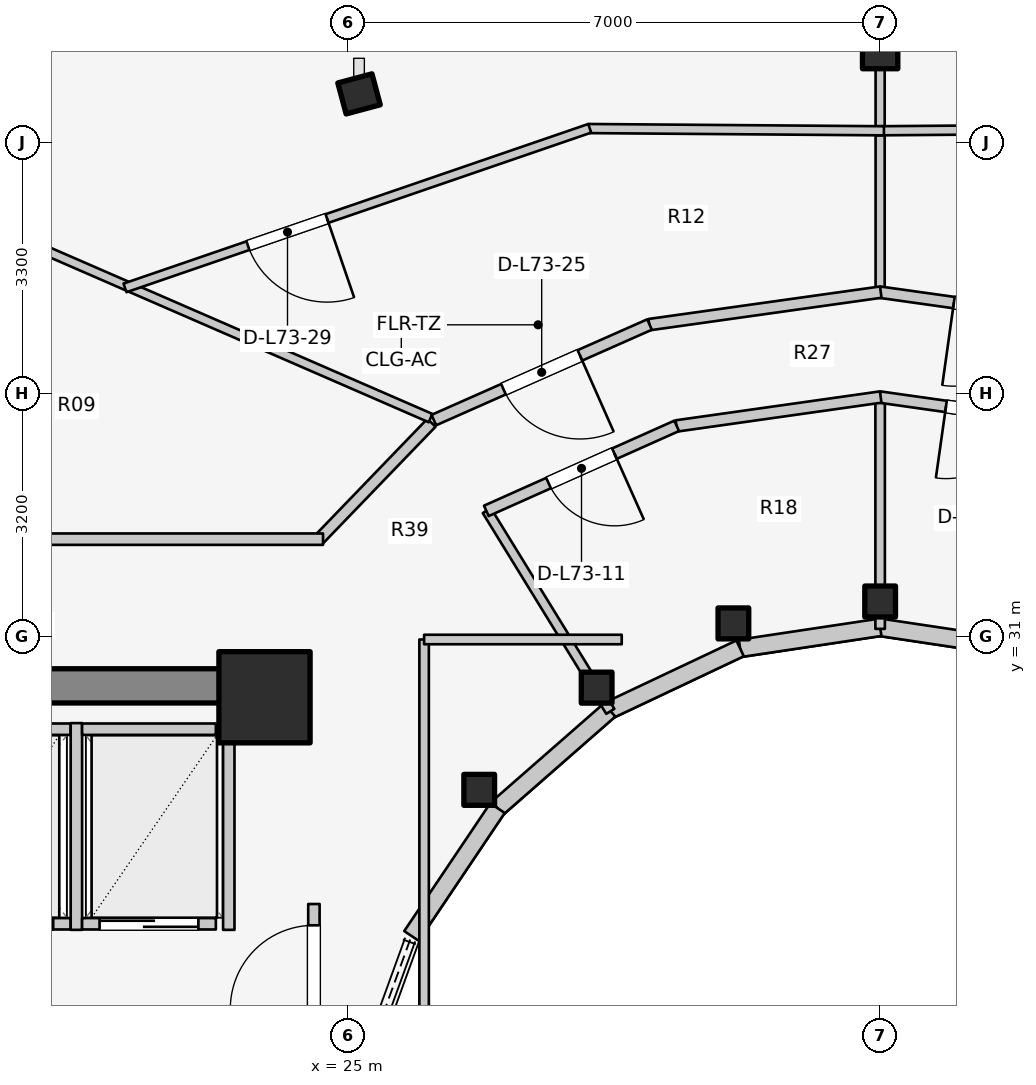
"""IFC4 building model, lengths in metres.
Left out: names, types, materials, properties, quantities, classifications, styles, units other than length and angle.
Written with IfcOpenShell. Run it as: python <this file> out.ifc"""

import sys

from ifc_helpers import new_model, si_unit, direction, frame, frame_2d, origin, origin_2d, place, context, subcontext, project, spatial, rectangle, i_section, extrude, element, fill, save


model = new_model("IFC4")
c1 = context("Model", 3, precision=1e-05, world=origin(), true_north=direction((0.0, 1.0)))
c2 = subcontext(c1, "Body", "Model", "MODEL_VIEW")
j1 = project(units=[si_unit("LENGTHUNIT", "METRE"), si_unit("PLANEANGLEUNIT", "RADIAN")], contexts=[c1])
p1 = place(None, origin())
s1 = spatial("IfcSite", under=j1, at=p1, CompositionType="ELEMENT")
p2 = place(p1, origin())
s2 = spatial("IfcBuilding", under=s1, at=p2, CompositionType="ELEMENT")
p3 = place(p2, frame((0.0, 0.0, 238.8)))
s3 = spatial("IfcBuildingStorey", under=s2, at=p3, CompositionType="ELEMENT", Elevation=238.8)
p4 = place(p3, frame((19.65, 30.35, 0.0), z_axis=(0.0, 0.0, 1.0), x_axis=(1.0, 0.0, 0.0)))
e1 = element("IfcWall", 1, at=p4, inside=s3, PredefinedType="SHEAR", context=c2, shape_type="SweptSolid", body=[
    extrude(rectangle(XDim=4.5, YDim=0.45, at=frame_2d((2.25, 0.0))), origin(), (0.0, 0.0, 1.0), 3.6),
])
p5 = place(p3, frame((23.9, 30.2, 0.0), z_axis=(0.0, 0.0, 1.0), x_axis=(1.0, 0.0, 0.0)))
e2 = element("IfcColumn", 2, at=p5, inside=s3, PredefinedType="COLUMN", context=c2, shape_type="SweptSolid", body=[
    extrude(rectangle(XDim=1.2, YDim=1.2, at=origin_2d()), origin(), (0.0, 0.0, 1.0), 3.6),
])
p6 = place(p3, frame((32.0, 31.46, 0.0), z_axis=(0.0, 0.0, 1.0), x_axis=(1.0, 0.0, 0.0)))
e3 = element("IfcColumn", 3, at=p6, inside=s3, PredefinedType="COLUMN", context=c2, shape_type="SweptSolid", body=[
    extrude(i_section(OverallWidth=0.404, OverallDepth=0.407, WebThickness=0.027, FlangeThickness=0.044, FilletRadius=0.025, at=origin_2d()), origin(), (0.0, 0.0, 1.0), 3.6),
])
p7 = place(p3, frame((32.0, 38.68, 0.0), z_axis=(0.0, 0.0, 1.0), x_axis=(0.0, 1.0, 0.0)))
e4 = element("IfcColumn", 4, at=p7, inside=s3, PredefinedType="COLUMN", context=c2, shape_type="SweptSolid", body=[
    extrude(i_section(OverallWidth=0.422, OverallDepth=0.465, WebThickness=0.045, FlangeThickness=0.073, FilletRadius=0.025, at=origin_2d()), origin(), (0.0, 0.0, 1.0), 3.6),
])
p8 = place(p3, frame((30.069, 31.172, 0.0), z_axis=(0.0, 0.0, 1.0), x_axis=(1.0, 0.0, 0.0)))
e5 = element("IfcColumn", 5, at=p8, inside=s3, PredefinedType="COLUMN", context=c2, shape_type="SweptSolid", body=[
    extrude(i_section(OverallWidth=0.404, OverallDepth=0.407, WebThickness=0.027, FlangeThickness=0.044, FilletRadius=0.025, at=origin_2d()), origin(), (0.0, 0.0, 1.0), 3.6),
])
p9 = place(p3, frame((25.144, 38.138, 0.0), z_axis=(0.0, 0.0, 1.0), x_axis=(-0.258819045103, 0.965925826289, 0.0)))
e6 = element("IfcColumn", 6, at=p9, inside=s3, PredefinedType="COLUMN", context=c2, shape_type="SweptSolid", body=[
    extrude(i_section(OverallWidth=0.422, OverallDepth=0.465, WebThickness=0.045, FlangeThickness=0.073, FilletRadius=0.025, at=origin_2d()), origin(), (0.0, 0.0, 1.0), 3.6),
])
for number, where, z_axis, x_axis in (
    (7, (28.27, 30.327, 0.0), (0.0, 0.0, 1.0), (1.0, 0.0, 0.0)),
    (8, (26.725, 28.982, 0.0), (0.0, 0.0, 1.0), (1.0, 0.0, 0.0)),
):
    element("IfcColumn", number, at=place(p3, frame(where, z_axis=z_axis, x_axis=x_axis)), inside=s3, PredefinedType="COLUMN", context=c2, shape_type="SweptSolid", body=[
        extrude(i_section(OverallWidth=0.404, OverallDepth=0.407, WebThickness=0.027, FlangeThickness=0.044, FilletRadius=0.025, at=origin_2d()), origin(), (0.0, 0.0, 1.0), 3.6),
    ])
for number, where, z_axis, x_axis in (
    (9, (33.843, 30.843, 0.0), (0.0, 0.0, 1.0), (-0.989, 0.149, 0.0)),
    (10, (32.0, 31.12, 0.0), (0.0, 0.0, 1.0), (-0.989, -0.149, 0.0)),
):
    element("IfcWall", number, at=place(p3, frame(where, z_axis=z_axis, x_axis=x_axis)), inside=s3, PredefinedType="STANDARD", context=c2, shape_type="SweptSolid", body=[
        extrude(rectangle(XDim=1.864, YDim=0.23, at=frame_2d((0.932, 0.0))), origin(), (0.0, 0.0, 1.0), 2.6),
    ])
p10 = place(p3, frame((30.157, 30.843, 0.0), z_axis=(0.0, 0.0, 1.0), x_axis=(-0.904179699603, -0.427152280606, 0.0)))
e11 = element("IfcWall", 11, at=p10, inside=s3, PredefinedType="STANDARD", context=c2, shape_type="SweptSolid", body=[
    extrude(rectangle(XDim=1.899, YDim=0.23, at=frame_2d((0.95, 0.0))), origin(), (0.0, 0.0, 1.0), 2.6),
])
p11 = place(p3, frame((28.44, 30.032, 0.0), z_axis=(0.0, 0.0, 1.0), x_axis=(-0.752576694707, -0.658504607869, 0.0)))
e12 = element("IfcWall", 12, at=p11, inside=s3, PredefinedType="STANDARD", context=c2, shape_type="SweptSolid", body=[
    extrude(rectangle(XDim=1.959, YDim=0.23, at=frame_2d((0.98, 0.0))), origin(), (0.0, 0.0, 1.0), 2.6),
])
p12 = place(p3, frame((26.965, 28.742, 0.0), z_axis=(0.0, 0.0, 1.0), x_axis=(-0.558197800898, -0.829707909492, 0.0)))
e13 = element("IfcWall", 13, at=p12, inside=s3, PredefinedType="STANDARD", context=c2, shape_type="SweptSolid", body=[
    extrude(rectangle(XDim=2.027, YDim=0.23, at=frame_2d((1.013, 0.0))), origin(), (0.0, 0.0, 1.0), 2.6),
])
p13 = place(p3, frame((19.59, 27.22, 0.0), z_axis=(0.0, 0.0, 1.0), x_axis=(1.0, 0.0, 0.0)))
e14 = element("IfcWall", 14, at=p13, inside=s3, PredefinedType="SOLIDWALL", context=c2, shape_type="SweptSolid", body=[
    extrude(rectangle(XDim=1.76, YDim=0.15, at=frame_2d((0.88, 0.0))), origin(), (0.0, 0.0, 1.0), 3.295),
])
p14 = place(p13, frame((0.23, 0.0, 0.0)))
e15 = element("IfcOpeningElement", 15, at=p14, cuts=e14, PredefinedType="OPENING", context=c2, shape_type="SweptSolid", body=[
    extrude(rectangle(XDim=1.3, YDim=2.1, at=frame_2d((0.65, 1.05))), frame((0.0, 0.085, 0.0), z_axis=(0.0, -1.0, 0.0), x_axis=(1.0, 0.0, 0.0)), (0.0, 0.0, 1.0), 0.17),
])
p15 = place(p3, frame((19.59, 29.78, 0.0), z_axis=(0.0, 0.0, 1.0), x_axis=(1.0, 0.0, 0.0)))
e16 = element("IfcWall", 16, at=p15, inside=s3, PredefinedType="SOLIDWALL", context=c2, shape_type="SweptSolid", body=[
    extrude(rectangle(XDim=1.76, YDim=0.15, at=frame_2d((0.88, 0.0))), origin(), (0.0, 0.0, 1.0), 3.295),
])
p16 = place(p3, frame((21.425, 27.14, 0.0), z_axis=(0.0, 0.0, 1.0), x_axis=(0.0, 1.0, 0.0)))
e17 = element("IfcWall", 17, at=p16, inside=s3, PredefinedType="SOLIDWALL", context=c2, shape_type="SweptSolid", body=[
    extrude(rectangle(XDim=2.72, YDim=0.15, at=frame_2d((1.36, 0.0))), origin(), (0.0, 0.0, 1.0), 3.295),
])
p17 = place(p3, frame((21.5, 27.22, 0.0), z_axis=(0.0, 0.0, 1.0), x_axis=(1.0, 0.0, 0.0)))
e18 = element("IfcWall", 18, at=p17, inside=s3, PredefinedType="SOLIDWALL", context=c2, shape_type="SweptSolid", body=[
    extrude(rectangle(XDim=1.76, YDim=0.15, at=frame_2d((0.88, 0.0))), origin(), (0.0, 0.0, 1.0), 3.295),
])
p18 = place(p17, frame((0.23, 0.0, 0.0)))
e19 = element("IfcOpeningElement", 19, at=p18, cuts=e18, PredefinedType="OPENING", context=c2, shape_type="SweptSolid", body=[
    extrude(rectangle(XDim=1.3, YDim=2.1, at=frame_2d((0.65, 1.05))), frame((0.0, 0.085, 0.0), z_axis=(0.0, -1.0, 0.0), x_axis=(1.0, 0.0, 0.0)), (0.0, 0.0, 1.0), 0.17),
])
p19 = place(p3, frame((21.5, 29.78, 0.0), z_axis=(0.0, 0.0, 1.0), x_axis=(1.0, 0.0, 0.0)))
e20 = element("IfcWall", 20, at=p19, inside=s3, PredefinedType="SOLIDWALL", context=c2, shape_type="SweptSolid", body=[
    extrude(rectangle(XDim=1.76, YDim=0.15, at=frame_2d((0.88, 0.0))), origin(), (0.0, 0.0, 1.0), 3.295),
])
p20 = place(p3, frame((23.43, 27.14, 0.0), z_axis=(0.0, 0.0, 1.0), x_axis=(0.0, 1.0, 0.0)))
e21 = element("IfcWall", 21, at=p20, inside=s3, PredefinedType="SOLIDWALL", context=c2, shape_type="SweptSolid", body=[
    extrude(rectangle(XDim=2.72, YDim=0.15, at=frame_2d((1.36, 0.0))), origin(), (0.0, 0.0, 1.0), 3.295),
])
p21 = place(p3, frame((24.55, 24.08, 0.0), z_axis=(0.0, 0.0, 1.0), x_axis=(0.0, 1.0, 0.0)))
e22 = element("IfcWall", 22, at=p21, inside=s3, PredefinedType="PARTITIONING", context=c2, shape_type="SweptSolid", body=[
    extrude(rectangle(XDim=3.4, YDim=0.15, at=frame_2d((1.7, 0.0))), origin(), (0.0, 0.0, 1.0), 3.295),
])
p22 = place(p21, frame((2.02, 0.0, 0.0)))
e23 = element("IfcOpeningElement", 23, at=p22, cuts=e22, PredefinedType="OPENING", context=c2, shape_type="SweptSolid", body=[
    extrude(rectangle(XDim=1.1, YDim=2.1, at=frame_2d((0.55, 1.05))), frame((0.0, 0.085, 0.0), z_axis=(0.0, -1.0, 0.0), x_axis=(1.0, 0.0, 0.0)), (0.0, 0.0, 1.0), 0.17),
])
p23 = place(p3, frame((32.0, 31.1, 0.0), z_axis=(0.0, 0.0, 1.0), x_axis=(0.0, 1.0, 0.0)))
e24 = element("IfcWall", 24, at=p23, inside=s3, PredefinedType="PARTITIONING", context=c2, shape_type="SweptSolid", body=[
    extrude(rectangle(XDim=3.05, YDim=0.125, at=frame_2d((1.525, 0.0))), origin(), (0.0, 0.0, 1.0), 2.672),
])
p24 = place(p3, frame((28.45, 30.015, 0.0), z_axis=(0.0, 0.0, 1.0), x_axis=(-0.523992004803, 0.851723182086, 0.0)))
e25 = element("IfcWall", 25, at=p24, inside=s3, PredefinedType="PARTITIONING", context=c2, shape_type="SweptSolid", body=[
    extrude(rectangle(XDim=3.101, YDim=0.125, at=frame_2d((1.551, 0.0))), origin(), (0.0, 0.0, 1.0), 2.672),
])
p25 = place(p3, frame((34.68, 33.77, 0.0), z_axis=(0.0, 0.0, 1.0), x_axis=(-0.990132151456, 0.140136799779, 0.0)))
e26 = element("IfcWall", 26, at=p25, inside=s3, PredefinedType="PARTITIONING", context=c2, shape_type="SweptSolid", body=[
    extrude(rectangle(XDim=2.714, YDim=0.15, at=frame_2d((1.357, 0.0))), origin(), (0.0, 0.0, 1.0), 2.823),
])
p26 = place(p25, frame((0.882, 0.0, 0.0)))
e27 = element("IfcOpeningElement", 27, at=p26, cuts=e26, PredefinedType="OPENING", context=c2, shape_type="SweptSolid", body=[
    extrude(rectangle(XDim=0.95, YDim=2.1, at=frame_2d((0.475, 1.05))), frame((0.0, 0.085, 0.0), z_axis=(0.0, -1.0, 0.0), x_axis=(1.0, 0.0, 0.0)), (0.0, 0.0, 1.0), 0.17),
])
p27 = place(p3, frame((32.007, 34.15, 0.0), z_axis=(0.0, 0.0, 1.0), x_axis=(-0.990132151456, -0.140136799779, 0.0)))
e28 = element("IfcWall", 28, at=p27, inside=s3, PredefinedType="PARTITIONING", context=c2, shape_type="SweptSolid", body=[
    extrude(rectangle(XDim=2.714, YDim=0.15, at=frame_2d((1.357, 0.0))), origin(), (0.0, 0.0, 1.0), 2.823),
])
p28 = place(p3, frame((29.323, 33.771, 0.0), z_axis=(0.0, 0.0, 1.0), x_axis=(-0.913120130558, -0.407690602257, 0.0)))
e29 = element("IfcWall", 29, at=p28, inside=s3, PredefinedType="PARTITIONING", context=c2, shape_type="SweptSolid", body=[
    extrude(rectangle(XDim=2.743, YDim=0.15, at=frame_2d((1.371, 0.0))), origin(), (0.0, 0.0, 1.0), 2.823),
])
p29 = place(p28, frame((0.896, 0.0, 0.0)))
e30 = element("IfcOpeningElement", 30, at=p29, cuts=e29, PredefinedType="OPENING", context=c2, shape_type="SweptSolid", body=[
    extrude(rectangle(XDim=0.95, YDim=2.1, at=frame_2d((0.475, 1.05))), frame((0.0, 0.085, 0.0), z_axis=(0.0, -1.0, 0.0), x_axis=(1.0, 0.0, 0.0)), (0.0, 0.0, 1.0), 0.17),
])
p30 = place(p3, frame((26.0, 25.8, 0.0), z_axis=(0.0, 0.0, 1.0), x_axis=(0.0, 1.0, 0.0)))
e31 = element("IfcWall", 31, at=p30, inside=s3, PredefinedType="PARTITIONING", context=c2, shape_type="SweptSolid", body=[
    extrude(rectangle(XDim=5.16, YDim=0.125, at=frame_2d((2.58, 0.0))), origin(), (0.0, 0.0, 1.0), 2.672),
])
p31 = place(p3, frame((26.0, 30.96, 0.0), z_axis=(0.0, 0.0, 1.0), x_axis=(1.0, 0.0, 0.0)))
e32 = element("IfcWall", 32, at=p31, inside=s3, PredefinedType="PARTITIONING", context=c2, shape_type="SweptSolid", body=[
    extrude(rectangle(XDim=2.6, YDim=0.125, at=frame_2d((1.3, 0.0))), origin(), (0.0, 0.0, 1.0), 2.816),
])
p32 = place(p3, frame((26.097, 33.812, 0.0), z_axis=(0.0, 0.0, 1.0), x_axis=(-0.694032962553, -0.719943224768, 0.0)))
e33 = element("IfcWall", 33, at=p32, inside=s3, PredefinedType="PARTITIONING", context=c2, shape_type="SweptSolid", body=[
    extrude(rectangle(XDim=2.158, YDim=0.15, at=frame_2d((1.079, 0.0))), origin(), (0.0, 0.0, 1.0), 2.816),
])
p33 = place(p3, frame((17.15, 32.28, 0.0), z_axis=(0.0, 0.0, 1.0), x_axis=(1.0, 0.0, 0.0)))
e34 = element("IfcWall", 34, at=p33, inside=s3, PredefinedType="PARTITIONING", context=c2, shape_type="SweptSolid", body=[
    extrude(rectangle(XDim=7.52, YDim=0.15, at=frame_2d((3.76, 0.0))), origin(), (0.0, 0.0, 1.0), 2.816),
])
p34 = place(p33, frame((1.3, 0.0, 0.0)))
e35 = element("IfcOpeningElement", 35, at=p34, cuts=e34, PredefinedType="OPENING", context=c2, shape_type="SweptSolid", body=[
    extrude(rectangle(XDim=0.9, YDim=2.1, at=frame_2d((0.45, 1.05))), frame((0.0, 0.085, 0.0), z_axis=(0.0, -1.0, 0.0), x_axis=(1.0, 0.0, 0.0)), (0.0, 0.0, 1.0), 0.17),
])
p35 = place(p3, frame((32.0, 35.585, 0.0), z_axis=(0.0, 0.0, 1.0), x_axis=(0.0, 1.0, 0.0)))
e36 = element("IfcWall", 36, at=p35, inside=s3, PredefinedType="MOVABLE", context=c2, shape_type="SweptSolid", body=[
    extrude(rectangle(XDim=2.895, YDim=0.12, at=frame_2d((1.448, 0.0))), origin(), (0.0, 0.0, 1.0), 2.66),
])
p36 = place(p3, frame((26.085, 33.873, 0.0), z_axis=(0.0, 0.0, 1.0), x_axis=(-0.916946661839, 0.399009798554, 0.0)))
e37 = element("IfcWall", 37, at=p36, inside=s3, PredefinedType="MOVABLE", context=c2, shape_type="SweptSolid", body=[
    extrude(rectangle(XDim=6.042, YDim=0.12, at=frame_2d((3.021, 0.0))), origin(), (0.0, 0.0, 1.0), 2.66),
])
p37 = place(p3, frame((35.038, 35.103, 0.0), z_axis=(0.0, 0.0, 1.0), x_axis=(-0.990295701983, 0.138976338396, 0.0)))
e38 = element("IfcWall", 38, at=p37, inside=s3, PredefinedType="PARTITIONING", context=c2, shape_type="SweptSolid", body=[
    extrude(rectangle(XDim=3.076, YDim=0.15, at=frame_2d((1.538, 0.0))), origin(), (0.0, 0.0, 1.0), 2.823),
])
p38 = place(p37, frame((0.988, 0.0, 0.0)))
e39 = element("IfcOpeningElement", 39, at=p38, cuts=e38, PredefinedType="OPENING", context=c2, shape_type="SweptSolid", body=[
    extrude(rectangle(XDim=1.1, YDim=2.1, at=frame_2d((0.55, 1.05))), frame((0.0, 0.085, 0.0), z_axis=(0.0, -1.0, 0.0), x_axis=(1.0, 0.0, 0.0)), (0.0, 0.0, 1.0), 0.17),
])
p39 = place(p3, frame((32.008, 35.53, 0.0), z_axis=(0.0, 0.0, 1.0), x_axis=(-0.990295701983, -0.138976338396, 0.0)))
e40 = element("IfcWall", 40, at=p39, inside=s3, PredefinedType="PARTITIONING", context=c2, shape_type="SweptSolid", body=[
    extrude(rectangle(XDim=3.076, YDim=0.15, at=frame_2d((1.538, 0.0))), origin(), (0.0, 0.0, 1.0), 2.823),
])
p40 = place(p3, frame((28.966, 35.104, 0.0), z_axis=(0.0, 0.0, 1.0), x_axis=(-0.914384748819, -0.404846305563, 0.0)))
e41 = element("IfcWall", 41, at=p40, inside=s3, PredefinedType="PARTITIONING", context=c2, shape_type="SweptSolid", body=[
    extrude(rectangle(XDim=3.104, YDim=0.15, at=frame_2d((1.552, 0.0))), origin(), (0.0, 0.0, 1.0), 2.823),
])
p41 = place(p40, frame((1.002, 0.0, 0.0)))
e42 = element("IfcOpeningElement", 42, at=p41, cuts=e41, PredefinedType="OPENING", context=c2, shape_type="SweptSolid", body=[
    extrude(rectangle(XDim=1.1, YDim=2.1, at=frame_2d((0.55, 1.05))), frame((0.0, 0.085, 0.0), z_axis=(0.0, -1.0, 0.0), x_axis=(1.0, 0.0, 0.0)), (0.0, 0.0, 1.0), 0.17),
])
p42 = place(p3, frame((35.841, 37.682, 0.0), z_axis=(0.0, 0.0, 1.0), x_axis=(-0.999971175398, -0.007592652624, 0.0)))
e43 = element("IfcWall", 43, at=p42, inside=s3, PredefinedType="MOVABLE", context=c2, shape_type="SweptSolid", body=[
    extrude(rectangle(XDim=3.891, YDim=0.12, at=frame_2d((1.945, 0.0))), origin(), (0.0, 0.0, 1.0), 2.823),
])
p43 = place(p42, frame((1.395, 0.0, 0.0)))
e44 = element("IfcOpeningElement", 44, at=p43, cuts=e43, PredefinedType="OPENING", context=c2, shape_type="SweptSolid", body=[
    extrude(rectangle(XDim=1.1, YDim=2.1, at=frame_2d((0.55, 1.05))), frame((0.0, 0.07, 0.0), z_axis=(0.0, -1.0, 0.0), x_axis=(1.0, 0.0, 0.0)), (0.0, 0.0, 1.0), 0.14),
])
p44 = place(p3, frame((32.05, 37.653, 0.0), z_axis=(0.0, 0.0, 1.0), x_axis=(-0.999971175398, 0.007592652624, 0.0)))
e45 = element("IfcWall", 45, at=p44, inside=s3, PredefinedType="MOVABLE", context=c2, shape_type="SweptSolid", body=[
    extrude(rectangle(XDim=3.891, YDim=0.12, at=frame_2d((1.945, 0.0))), origin(), (0.0, 0.0, 1.0), 2.823),
])
p45 = place(p3, frame((28.179, 37.685, 0.0), z_axis=(0.0, 0.0, 1.0), x_axis=(-0.945789589552, -0.324780005995, 0.0)))
e46 = element("IfcWall", 46, at=p45, inside=s3, PredefinedType="MOVABLE", context=c2, shape_type="SweptSolid", body=[
    extrude(rectangle(XDim=6.465, YDim=0.12, at=frame_2d((3.232, 0.0))), origin(), (0.0, 0.0, 1.0), 2.823),
])
p46 = place(p45, frame((3.654, 0.0, 0.0)))
e47 = element("IfcOpeningElement", 47, at=p46, cuts=e46, PredefinedType="OPENING", context=c2, shape_type="SweptSolid", body=[
    extrude(rectangle(XDim=1.1, YDim=2.1, at=frame_2d((0.55, 1.05))), frame((0.0, 0.07, 0.0), z_axis=(0.0, -1.0, 0.0), x_axis=(1.0, 0.0, 0.0)), (0.0, 0.0, 1.0), 0.14),
])
p47 = place(p14, origin())
e48 = element("IfcDoor", 48, at=p47, inside=s3, OperationType="DOUBLE_DOOR_SLIDING", PredefinedType="DOOR", context=c2, shape_type="SweptSolid", body=[
    extrude(rectangle(XDim=1.3, YDim=2.1, at=frame_2d((0.65, 1.05))), frame((0.0, 0.025, 0.0), z_axis=(0.0, -1.0, 0.0), x_axis=(1.0, 0.0, 0.0)), (0.0, 0.0, 1.0), 0.05),
])
fill(e15, e48)
p48 = place(p18, origin())
e49 = element("IfcDoor", 49, at=p48, inside=s3, OperationType="DOUBLE_DOOR_SLIDING", PredefinedType="DOOR", context=c2, shape_type="SweptSolid", body=[
    extrude(rectangle(XDim=1.3, YDim=2.1, at=frame_2d((0.65, 1.05))), frame((0.0, 0.025, 0.0), z_axis=(0.0, -1.0, 0.0), x_axis=(1.0, 0.0, 0.0)), (0.0, 0.0, 1.0), 0.05),
])
fill(e19, e49)
p49 = place(p22, origin())
e50 = element("IfcDoor", 50, at=p49, inside=s3, OperationType="SINGLE_SWING_LEFT", PredefinedType="DOOR", context=c2, shape_type="SweptSolid", body=[
    extrude(rectangle(XDim=1.1, YDim=2.1, at=frame_2d((0.55, 1.05))), frame((0.0, 0.025, 0.0), z_axis=(0.0, -1.0, 0.0), x_axis=(1.0, 0.0, 0.0)), (0.0, 0.0, 1.0), 0.05),
])
fill(e23, e50)
p50 = place(p26, origin())
e51 = element("IfcDoor", 51, at=p50, inside=s3, OperationType="SINGLE_SWING_RIGHT", PredefinedType="DOOR", context=c2, shape_type="SweptSolid", body=[
    extrude(rectangle(XDim=0.95, YDim=2.1, at=frame_2d((0.475, 1.05))), frame((0.0, 0.025, 0.0), z_axis=(0.0, -1.0, 0.0), x_axis=(1.0, 0.0, 0.0)), (0.0, 0.0, 1.0), 0.05),
])
fill(e27, e51)
p51 = place(p29, origin())
e52 = element("IfcDoor", 52, at=p51, inside=s3, OperationType="SINGLE_SWING_LEFT", PredefinedType="DOOR", context=c2, shape_type="SweptSolid", body=[
    extrude(rectangle(XDim=0.95, YDim=2.1, at=frame_2d((0.475, 1.05))), frame((0.0, 0.025, 0.0), z_axis=(0.0, -1.0, 0.0), x_axis=(1.0, 0.0, 0.0)), (0.0, 0.0, 1.0), 0.05),
])
fill(e30, e52)
p52 = place(p38, origin())
e53 = element("IfcDoor", 53, at=p52, inside=s3, OperationType="SINGLE_SWING_RIGHT", PredefinedType="DOOR", context=c2, shape_type="SweptSolid", body=[
    extrude(rectangle(XDim=1.1, YDim=2.1, at=frame_2d((0.55, 1.05))), frame((0.0, 0.025, 0.0), z_axis=(0.0, -1.0, 0.0), x_axis=(1.0, 0.0, 0.0)), (0.0, 0.0, 1.0), 0.05),
])
fill(e39, e53)
p53 = place(p41, origin())
e54 = element("IfcDoor", 54, at=p53, inside=s3, OperationType="SINGLE_SWING_LEFT", PredefinedType="DOOR", context=c2, shape_type="SweptSolid", body=[
    extrude(rectangle(XDim=1.1, YDim=2.1, at=frame_2d((0.55, 1.05))), frame((0.0, 0.025, 0.0), z_axis=(0.0, -1.0, 0.0), x_axis=(1.0, 0.0, 0.0)), (0.0, 0.0, 1.0), 0.05),
])
fill(e42, e54)
p54 = place(p46, origin())
e55 = element("IfcDoor", 55, at=p54, inside=s3, OperationType="SINGLE_SWING_LEFT", PredefinedType="DOOR", context=c2, shape_type="SweptSolid", body=[
    extrude(rectangle(XDim=1.1, YDim=2.1, at=frame_2d((0.55, 1.05))), frame((0.0, 0.025, 0.0), z_axis=(0.0, -1.0, 0.0), x_axis=(1.0, 0.0, 0.0)), (0.0, 0.0, 1.0), 0.05),
])
fill(e47, e55)
save(model, sys.argv[1])
